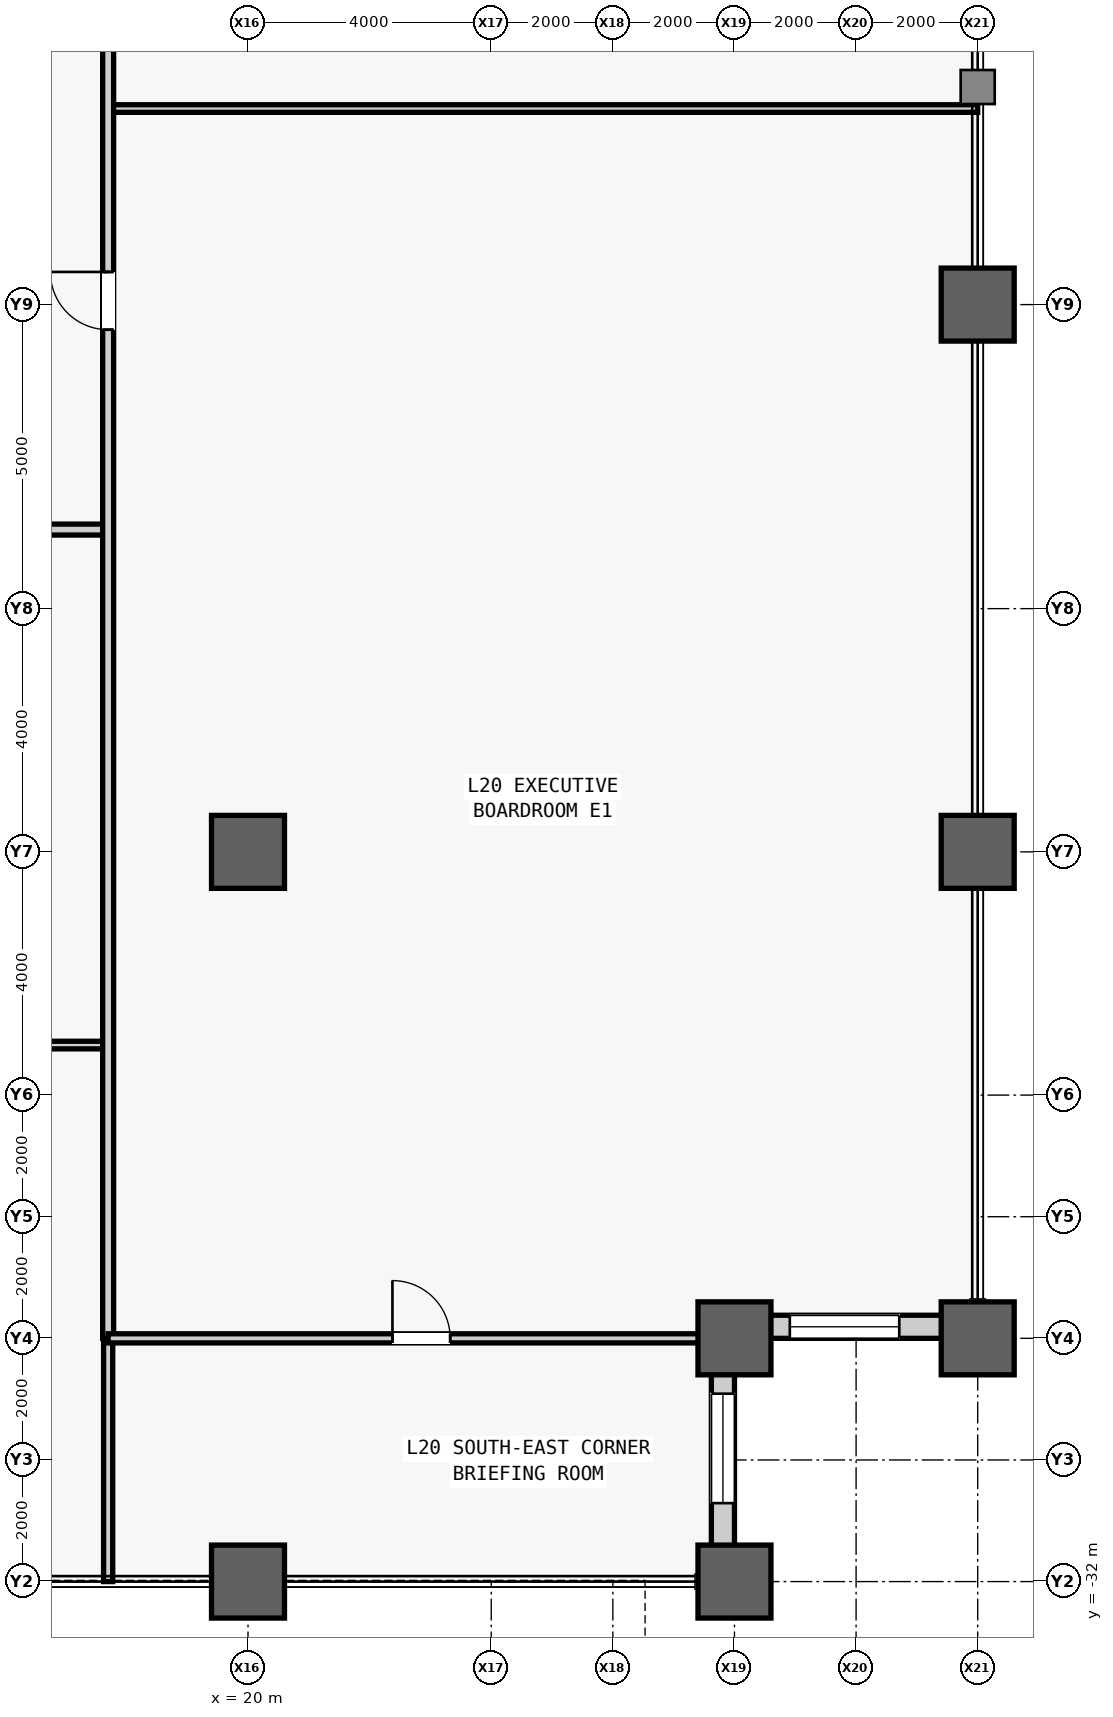
"""IFC4 building model, lengths in metres.
Left out: names, types, materials, properties, quantities, classifications, styles, units other than length and angle.
Written with IfcOpenShell. Run it as: python <this file> out.ifc"""

import sys

from ifc_helpers import new_model, si_unit, direction, frame, frame_2d, origin, origin_2d, place, context, subcontext, project, spatial, rectangle, hollow_rectangle, extrude, source, transform, mapped, element, fill, save


model = new_model("IFC4")
c1 = context("Model", 3, precision=1e-05, world=origin(), true_north=direction((0.0, 1.0)))
c2 = subcontext(c1, "Body", "Model", "MODEL_VIEW")
j1 = project(units=[si_unit("LENGTHUNIT", "METRE"), si_unit("PLANEANGLEUNIT", "RADIAN")], contexts=[c1])
p1 = place(None, origin())
s1 = spatial("IfcSite", under=j1, at=p1, CompositionType="ELEMENT")
p2 = place(p1, origin())
s2 = spatial("IfcBuilding", under=s1, at=p2, CompositionType="ELEMENT")
p3 = place(p2, frame((0.0, 0.0, 91.4)))
s3 = spatial("IfcBuildingStorey", under=s2, at=p3, CompositionType="ELEMENT", Elevation=91.4)
m1 = source(origin(), c2, "Body", "SweptSolid", [
    extrude(hollow_rectangle(XDim=1.2, YDim=1.2, WallThickness=0.07, at=origin_2d()), origin(), (0.0, 0.0, 1.0), 4.1),
])
for number, where, z_axis, x_axis in (
    (1, (20.0, -32.0, 0.0), (0.0, 0.0, 1.0), (1.0, 0.0, 0.0)),
    (2, (20.0, -20.0, 0.0), (0.0, 0.0, 1.0), (1.0, 0.0, 0.0)),
    (3, (28.0, -32.0, 0.0), (0.0, 0.0, 1.0), (1.0, 0.0, 0.0)),
    (4, (28.0, -28.0, 0.0), (0.0, 0.0, 1.0), (1.0, 0.0, 0.0)),
    (5, (32.0, -28.0, 0.0), (0.0, 0.0, 1.0), (1.0, 0.0, 0.0)),
    (6, (32.0, -20.0, 0.0), (0.0, 0.0, 1.0), (1.0, 0.0, 0.0)),
    (7, (32.0, -11.0, 0.0), (0.0, 0.0, 1.0), (1.0, 0.0, 0.0)),
):
    element("IfcColumn", number, at=place(p3, frame(where, z_axis=z_axis, x_axis=x_axis)), inside=s3, PredefinedType="COLUMN", context=c2, shape_type="MappedRepresentation", body=[
        mapped(m1, transform((0.0, 0.0, 0.0), scale=1.0)),
    ])
m2 = source(origin(), c2, "Body", "SweptSolid", [
    extrude(rectangle(XDim=3.62, YDim=0.38, at=frame_2d((1.81, 0.0))), origin(), (0.0, 0.0, 1.0), 3.145),
])
p4 = place(p3, frame((27.81, -31.62, 0.0), z_axis=(0.0, 0.0, 1.0), x_axis=(0.0, 1.0, 0.0)))
e8 = element("IfcWall", 8, at=p4, inside=s3, PredefinedType="STANDARD", context=c2, shape_type="MappedRepresentation", body=[
    mapped(m2, transform((0.0, 0.0, 0.0), scale=1.0)),
])
m3 = source(origin(), c2, "Body", "SweptSolid", [
    extrude(rectangle(XDim=1.8, YDim=2.4, at=frame_2d((0.9, 1.2))), frame((0.0, 0.2, 0.0), z_axis=(0.0, -1.0, 0.0), x_axis=(1.0, 0.0, 0.0)), (0.0, 0.0, 1.0), 0.4),
])
p5 = place(p4, frame((0.91, 0.0, 0.5)))
e9 = element("IfcOpeningElement", 9, at=p5, cuts=e8, PredefinedType="OPENING", context=c2, shape_type="MappedRepresentation", body=[
    mapped(m3, transform((0.0, 0.0, 0.0), scale=1.0)),
])
p6 = place(p3, frame((28.0, -27.81, 0.0), z_axis=(0.0, 0.0, 1.0), x_axis=(1.0, 0.0, 0.0)))
e10 = element("IfcWall", 10, at=p6, inside=s3, PredefinedType="STANDARD", context=c2, shape_type="MappedRepresentation", body=[
    mapped(m2, transform((0.0, 0.0, 0.0), scale=1.0)),
])
p7 = place(p6, frame((0.91, 0.0, 0.5)))
e11 = element("IfcOpeningElement", 11, at=p7, cuts=e10, PredefinedType="OPENING", context=c2, shape_type="MappedRepresentation", body=[
    mapped(m3, transform((0.0, 0.0, 0.0), scale=1.0)),
])
m4 = source(origin(), c2, "Body", "SweptSolid", [
    extrude(rectangle(XDim=37.1, YDim=0.125, at=frame_2d((18.55, 0.0))), origin(), (0.0, 0.0, 1.0), 3.84),
])
p8 = place(p3, frame((-19.4, -23.177, 0.0), z_axis=(0.0, 0.0, 1.0), x_axis=(1.0, 0.0, 0.0)))
e12 = element("IfcWall", 12, at=p8, inside=s3, PredefinedType="PARTITIONING", context=c2, shape_type="MappedRepresentation", body=[
    mapped(m4, transform((0.0, 0.0, 0.0), scale=1.0)),
])
m5 = source(origin(), c2, "Body", "SweptSolid", [
    extrude(rectangle(XDim=0.95, YDim=2.15, at=frame_2d((0.475, 1.075))), frame((0.0, 0.073, 0.0), z_axis=(0.0, -1.0, 0.0), x_axis=(1.0, 0.0, 0.0)), (0.0, 0.0, 1.0), 0.145),
])
p9 = place(p8, frame((18.075, 0.0, 0.0)))
e13 = element("IfcOpeningElement", 13, at=p9, cuts=e12, PredefinedType="OPENING", context=c2, shape_type="MappedRepresentation", body=[
    mapped(m5, transform((0.0, 0.0, 0.0), scale=1.0)),
])
m6 = source(origin(), c2, "Body", "SweptSolid", [
    extrude(rectangle(XDim=37.1, YDim=0.18, at=frame_2d((18.55, 0.0))), origin(), (0.0, 0.0, 1.0), 3.84),
])
p10 = place(p3, frame((-19.4, -14.7, 0.0), z_axis=(0.0, 0.0, 1.0), x_axis=(1.0, 0.0, 0.0)))
e14 = element("IfcWall", 14, at=p10, inside=s3, PredefinedType="PARTITIONING", context=c2, shape_type="MappedRepresentation", body=[
    mapped(m6, transform((0.0, 0.0, 0.0), scale=1.0)),
])
m7 = source(origin(), c2, "Body", "SweptSolid", [
    extrude(rectangle(XDim=1.05, YDim=2.2, at=frame_2d((0.525, 1.1))), frame((0.0, 0.1, 0.0), z_axis=(0.0, -1.0, 0.0), x_axis=(1.0, 0.0, 0.0)), (0.0, 0.0, 1.0), 0.2),
])
p11 = place(p10, frame((18.875, 0.0, 0.0)))
e15 = element("IfcOpeningElement", 15, at=p11, cuts=e14, PredefinedType="OPENING", context=c2, shape_type="MappedRepresentation", body=[
    mapped(m7, transform((0.0, 0.0, 0.0), scale=1.0)),
])
m8 = source(origin(), c2, "Body", "SweptSolid", [
    extrude(rectangle(XDim=4.0, YDim=0.15, at=frame_2d((2.0, 0.0))), origin(), (0.0, 0.0, 1.0), 3.84),
])
p12 = place(p3, frame((17.7, -32.0, 0.0), z_axis=(0.0, 0.0, 1.0), x_axis=(0.0, 1.0, 0.0)))
e16 = element("IfcWall", 16, at=p12, inside=s3, PredefinedType="PARTITIONING", context=c2, shape_type="MappedRepresentation", body=[
    mapped(m8, transform((0.0, 0.0, 0.0), scale=1.0)),
])
m9 = source(origin(), c2, "Body", "SweptSolid", [
    extrude(rectangle(XDim=14.3, YDim=0.125, at=frame_2d((7.15, 0.0))), origin(), (0.0, 0.0, 1.0), 3.84),
])
p13 = place(p3, frame((17.7, -7.776, 0.0), z_axis=(0.0, 0.0, 1.0), x_axis=(1.0, 0.0, 0.0)))
e17 = element("IfcWall", 17, at=p13, inside=s3, PredefinedType="PARTITIONING", context=c2, shape_type="MappedRepresentation", body=[
    mapped(m9, transform((0.0, 0.0, 0.0), scale=1.0)),
])
m10 = source(origin(), c2, "Body", "SweptSolid", [
    extrude(rectangle(XDim=56.0, YDim=0.18, at=frame_2d((28.0, 0.0))), origin(), (0.0, 0.0, 1.0), 3.84),
])
p14 = place(p3, frame((17.7, -28.0, 0.0), z_axis=(0.0, 0.0, 1.0), x_axis=(0.0, 1.0, 0.0)))
e18 = element("IfcWall", 18, at=p14, inside=s3, PredefinedType="PARTITIONING", context=c2, shape_type="MappedRepresentation", body=[
    mapped(m10, transform((0.0, 0.0, 0.0), scale=1.0)),
])
m11 = source(origin(), c2, "Body", "SweptSolid", [
    extrude(rectangle(XDim=0.95, YDim=2.15, at=frame_2d((0.475, 1.075))), frame((0.0, 0.1, 0.0), z_axis=(0.0, -1.0, 0.0), x_axis=(1.0, 0.0, 0.0)), (0.0, 0.0, 1.0), 0.2),
])
p15 = place(p14, frame((16.587, 0.0, 0.0)))
e19 = element("IfcOpeningElement", 19, at=p15, cuts=e18, PredefinedType="OPENING", context=c2, shape_type="MappedRepresentation", body=[
    mapped(m11, transform((0.0, 0.0, 0.0), scale=1.0)),
])
p16 = place(p14, frame((23.788, 0.0, 0.0)))
e20 = element("IfcOpeningElement", 20, at=p16, cuts=e18, PredefinedType="OPENING", context=c2, shape_type="MappedRepresentation", body=[
    mapped(m11, transform((0.0, 0.0, 0.0), scale=1.0)),
])
p17 = place(p14, frame((31.577, 0.0, 0.0)))
e21 = element("IfcOpeningElement", 21, at=p17, cuts=e18, PredefinedType="OPENING", context=c2, shape_type="MappedRepresentation", body=[
    mapped(m11, transform((0.0, 0.0, 0.0), scale=1.0)),
])
p18 = place(p14, frame((38.201, 0.0, 0.0)))
e22 = element("IfcOpeningElement", 22, at=p18, cuts=e18, PredefinedType="OPENING", context=c2, shape_type="MappedRepresentation", body=[
    mapped(m11, transform((0.0, 0.0, 0.0), scale=1.0)),
])
m12 = source(origin(), c2, "Body", "SweptSolid", [
    extrude(rectangle(XDim=10.3, YDim=0.15, at=frame_2d((5.15, 0.0))), origin(), (0.0, 0.0, 1.0), 3.84),
])
p19 = place(p3, frame((17.7, -28.0, 0.0), z_axis=(0.0, 0.0, 1.0), x_axis=(1.0, 0.0, 0.0)))
e23 = element("IfcWall", 23, at=p19, inside=s3, PredefinedType="PARTITIONING", context=c2, shape_type="MappedRepresentation", body=[
    mapped(m12, transform((0.0, 0.0, 0.0), scale=1.0)),
])
m13 = source(origin(), c2, "Body", "SweptSolid", [
    extrude(rectangle(XDim=0.95, YDim=2.15, at=frame_2d((0.475, 1.075))), frame((0.0, 0.085, 0.0), z_axis=(0.0, -1.0, 0.0), x_axis=(1.0, 0.0, 0.0)), (0.0, 0.0, 1.0), 0.17),
])
p20 = place(p19, frame((4.675, 0.0, 0.0)))
e24 = element("IfcOpeningElement", 24, at=p20, cuts=e23, PredefinedType="OPENING", context=c2, shape_type="MappedRepresentation", body=[
    mapped(m13, transform((0.0, 0.0, 0.0), scale=1.0)),
])
m14 = source(origin(), c2, "Body", "SweptSolid", [
    extrude(rectangle(XDim=1.8, YDim=2.4, at=frame_2d((0.9, 1.2))), frame((0.0, 0.03, 0.0), z_axis=(0.0, -1.0, 0.0), x_axis=(1.0, 0.0, 0.0)), (0.0, 0.0, 1.0), 0.06),
])
p21 = place(p5, origin())
e25 = element("IfcWindow", 25, at=p21, inside=s3, PartitioningType="SINGLE_PANEL", PredefinedType="WINDOW", context=c2, shape_type="MappedRepresentation", body=[
    mapped(m14, transform((0.0, 0.0, 0.0), scale=1.0)),
])
fill(e9, e25)
p22 = place(p7, origin())
e26 = element("IfcWindow", 26, at=p22, inside=s3, PartitioningType="SINGLE_PANEL", PredefinedType="WINDOW", context=c2, shape_type="MappedRepresentation", body=[
    mapped(m14, transform((0.0, 0.0, 0.0), scale=1.0)),
])
fill(e11, e26)
m15 = source(origin(), c2, "Body", "SweptSolid", [
    extrude(rectangle(XDim=0.95, YDim=2.15, at=frame_2d((0.475, 1.075))), frame((0.0, 0.025, 0.0), z_axis=(0.0, -1.0, 0.0), x_axis=(1.0, 0.0, 0.0)), (0.0, 0.0, 1.0), 0.05),
])
p23 = place(p15, origin())
e27 = element("IfcDoor", 27, at=p23, inside=s3, OperationType="SINGLE_SWING_RIGHT", PredefinedType="DOOR", context=c2, shape_type="MappedRepresentation", body=[
    mapped(m15, transform((0.0, 0.0, 0.0), scale=1.0)),
])
fill(e19, e27)
p24 = place(p20, origin())
e28 = element("IfcDoor", 28, at=p24, inside=s3, OperationType="SINGLE_SWING_LEFT", PredefinedType="DOOR", context=c2, shape_type="MappedRepresentation", body=[
    mapped(m15, transform((0.0, 0.0, 0.0), scale=1.0)),
])
fill(e24, e28)
save(model, sys.argv[1])
